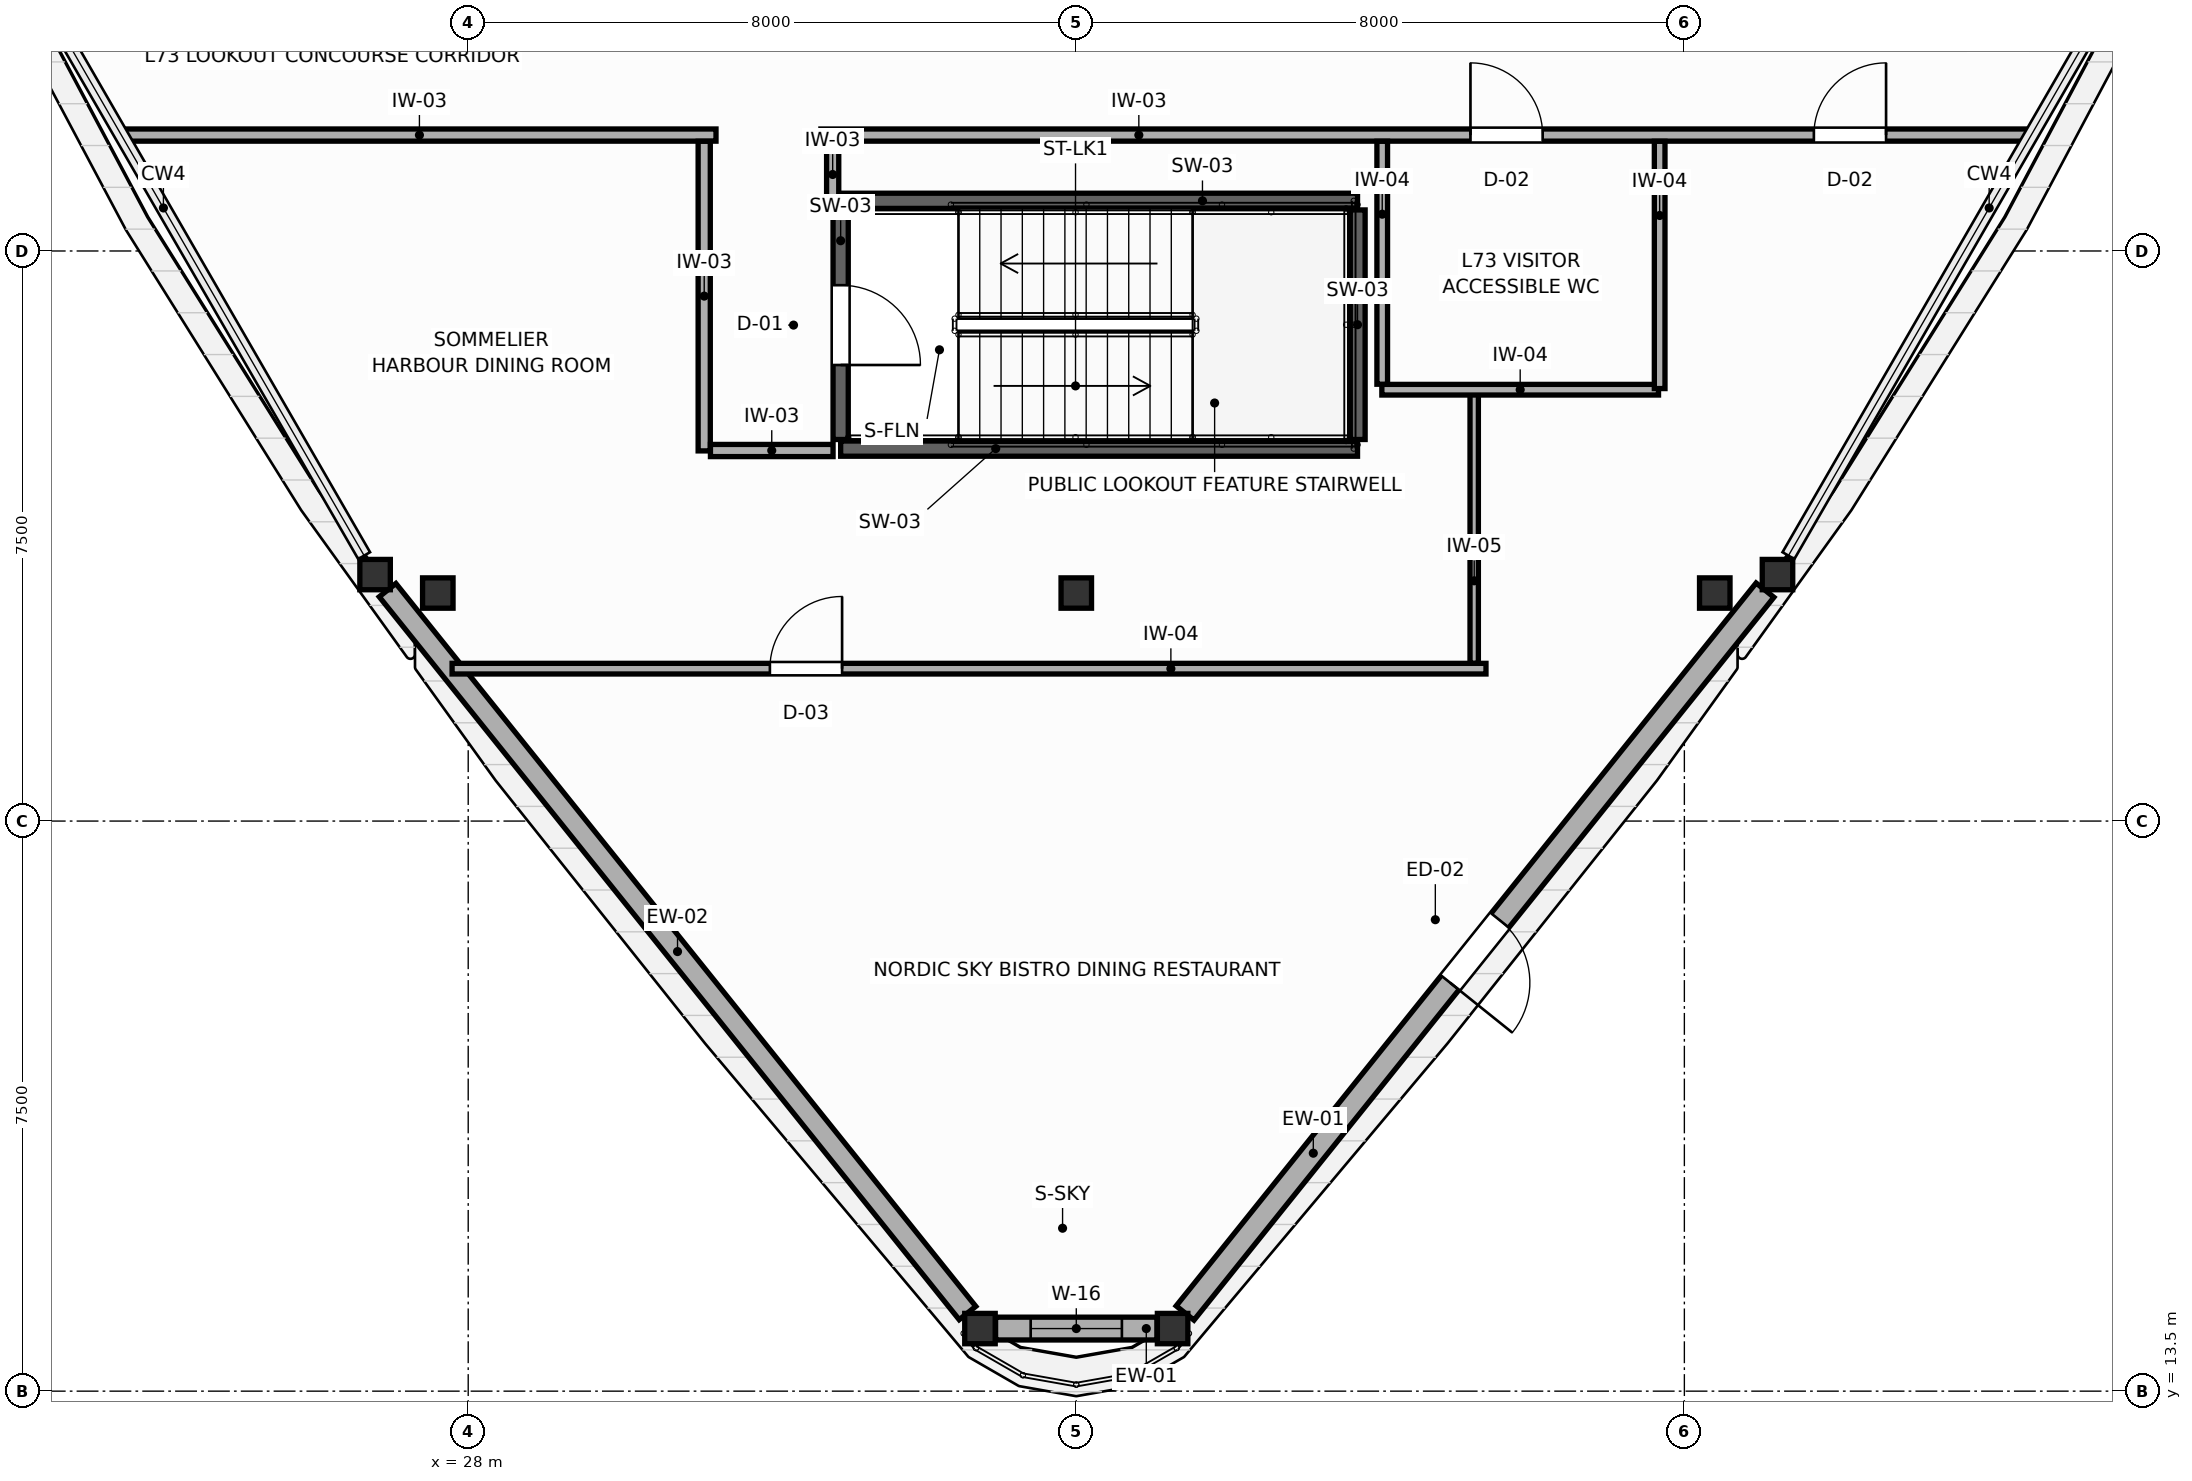
"""IFC4 building model, lengths in metres.
Left out: names, types, materials, properties, quantities, classifications, styles, units other than length and angle.
Written with IfcOpenShell. Run it as: python <this file> out.ifc"""

import sys

from ifc_helpers import new_model, si_unit, direction, frame, frame_2d, origin, origin_2d, place, context, subcontext, project, spatial, rectangle, i_section, extrude, source, transform, mapped, element, fill, save


model = new_model("IFC4")
c1 = context("Model", 3, precision=1e-05, world=origin(), true_north=direction((0.0, 1.0)))
c2 = subcontext(c1, "Body", "Model", "MODEL_VIEW")
j1 = project(units=[si_unit("LENGTHUNIT", "METRE"), si_unit("PLANEANGLEUNIT", "RADIAN")], contexts=[c1])
p1 = place(None, origin())
s1 = spatial("IfcSite", under=j1, at=p1, CompositionType="ELEMENT")
p2 = place(p1, origin())
s2 = spatial("IfcBuilding", under=s1, at=p2, CompositionType="ELEMENT")
p3 = place(p2, frame((0.0, 0.0, 279.6)))
s3 = spatial("IfcBuildingStorey", under=s2, at=p3, CompositionType="ELEMENT", Elevation=279.6)
m1 = source(origin(), c2, "Body", "SweptSolid", [
    extrude(i_section(OverallWidth=0.401, OverallDepth=0.399, WebThickness=0.022, FlangeThickness=0.036, FilletRadius=0.015, at=origin_2d()), origin(), (0.0, 0.0, 1.0), 4.2),
])
for number, where, z_axis, x_axis in (
    (1, (27.6, 24.0, 0.0), (0.0, 0.0, 1.0), (1.0, 0.0, 0.0)),
    (2, (44.4, 24.0, 0.0), (0.0, 0.0, 1.0), (1.0, 0.0, 0.0)),
    (3, (36.0, 24.0, 0.0), (0.0, 0.0, 1.0), (1.0, 0.0, 0.0)),
):
    element("IfcColumn", number, at=place(p3, frame(where, z_axis=z_axis, x_axis=x_axis)), inside=s3, PredefinedType="COLUMN", context=c2, shape_type="MappedRepresentation", body=[
        mapped(m1, transform((0.0, 0.0, 0.0), scale=1.0)),
    ])
for number, where, z_axis, x_axis in (
    (4, (32.9, 29.16, 0.0), (0.0, 0.0, 1.0), (1.0, 0.0, 0.0)),
    (5, (32.9, 25.9, 0.0), (0.0, 0.0, 1.0), (1.0, 0.0, 0.0)),
):
    element("IfcWall", number, at=place(p3, frame(where, z_axis=z_axis, x_axis=x_axis)), inside=s3, PredefinedType="SHEAR", context=c2, shape_type="SweptSolid", body=[
        extrude(rectangle(XDim=6.8, YDim=0.2, at=frame_2d((3.4, 0.0))), origin(), (0.0, 0.0, 1.0), 4.2),
    ])
p4 = place(p3, frame((39.7, 26.02, 0.0), z_axis=(0.0, 0.0, 1.0), x_axis=(0.0, 1.0, 0.0)))
e6 = element("IfcWall", 6, at=p4, inside=s3, PredefinedType="SHEAR", context=c2, shape_type="SweptSolid", body=[
    extrude(rectangle(XDim=3.02, YDim=0.2, at=frame_2d((1.51, 0.0))), origin(), (0.0, 0.0, 1.0), 4.2),
])
for number, where, z_axis, x_axis in (
    (7, (26.775, 24.243, 0.0), (0.0, 0.0, 1.0), (1.0, 0.0, 0.0)),
    (8, (34.733, 14.323, 0.0), (0.0, 0.0, 1.0), (1.0, 0.0, 0.0)),
    (9, (37.267, 14.323, 0.0), (0.0, 0.0, 1.0), (1.0, 0.0, 0.0)),
    (10, (45.225, 24.243, 0.0), (0.0, 0.0, 1.0), (1.0, 0.0, 0.0)),
):
    element("IfcColumn", number, at=place(p3, frame(where, z_axis=z_axis, x_axis=x_axis)), inside=s3, PredefinedType="COLUMN", context=c2, shape_type="MappedRepresentation", body=[
        mapped(m1, transform((0.0, 0.0, 0.0), scale=1.0)),
    ])
p5 = place(p3, frame((26.939, 24.038, 0.0), z_axis=(0.0, 0.0, 1.0), x_axis=(0.625766469369, -0.780010465195, 0.0)))
e11 = element("IfcWall", 11, at=p5, inside=s3, PredefinedType="SOLIDWALL", context=c2, shape_type="SweptSolid", body=[
    extrude(rectangle(XDim=12.192, YDim=0.28, at=frame_2d((6.096, 0.0))), origin(), (0.0, 0.0, 1.0), 2.52),
])
p6 = place(p3, frame((34.938, 14.323, 0.0), z_axis=(0.0, 0.0, 1.0), x_axis=(1.0, 0.0, 0.0)))
e12 = element("IfcWall", 12, at=p6, inside=s3, PredefinedType="SOLIDWALL", context=c2, shape_type="SweptSolid", body=[
    extrude(rectangle(XDim=2.124, YDim=0.3, at=frame_2d((1.062, 0.0))), origin(), (0.0, 0.0, 1.0), 2.52),
])
p7 = place(p6, frame((0.462, 0.0, 0.75)))
e13 = element("IfcOpeningElement", 13, at=p7, cuts=e12, PredefinedType="OPENING", context=c2, shape_type="SweptSolid", body=[
    extrude(rectangle(XDim=1.2, YDim=1.55, at=frame_2d((0.6, 0.775))), frame((0.0, 0.16, 0.0), z_axis=(0.0, -1.0, 0.0), x_axis=(1.0, 0.0, 0.0)), (0.0, 0.0, 1.0), 0.32),
])
p8 = place(p3, frame((37.431, 14.528, 0.0), z_axis=(0.0, 0.0, 1.0), x_axis=(0.625766469369, 0.780010465195, 0.0)))
e14 = element("IfcWall", 14, at=p8, inside=s3, PredefinedType="SOLIDWALL", context=c2, shape_type="SweptSolid", body=[
    extrude(rectangle(XDim=12.192, YDim=0.3, at=frame_2d((6.096, 0.0))), origin(), (0.0, 0.0, 1.0), 2.52),
])
p9 = place(p8, frame((5.571, 0.0, 0.0)))
e15 = element("IfcOpeningElement", 15, at=p9, cuts=e14, PredefinedType="OPENING", context=c2, shape_type="SweptSolid", body=[
    extrude(rectangle(XDim=1.05, YDim=2.1, at=frame_2d((0.525, 1.05))), frame((0.0, 0.16, 0.0), z_axis=(0.0, -1.0, 0.0), x_axis=(1.0, 0.0, 0.0)), (0.0, 0.0, 1.0), 0.32),
])
p10 = place(p3, frame((32.9, 26.02, 0.0), z_axis=(0.0, 0.0, 1.0), x_axis=(0.0, 1.0, 0.0)))
e16 = element("IfcWall", 16, at=p10, inside=s3, PredefinedType="SHEAR", context=c2, shape_type="SweptSolid", body=[
    extrude(rectangle(XDim=3.02, YDim=0.2, at=frame_2d((1.51, 0.0))), origin(), (0.0, 0.0, 1.0), 4.2),
])
p11 = place(p10, frame((0.98, 0.0, 0.0)))
e17 = element("IfcOpeningElement", 17, at=p11, cuts=e16, PredefinedType="OPENING", context=c2, shape_type="SweptSolid", body=[
    extrude(rectangle(XDim=1.05, YDim=2.1, at=frame_2d((0.525, 1.05))), frame((0.0, 0.11, 0.0), z_axis=(0.0, -1.0, 0.0), x_axis=(1.0, 0.0, 0.0)), (0.0, 0.0, 1.0), 0.22),
])
p12 = place(p3, frame((32.64, 30.025, 0.0), z_axis=(0.0, 0.0, 1.0), x_axis=(1.0, 0.0, 0.0)))
e18 = element("IfcWall", 18, at=p12, inside=s3, PredefinedType="PARTITIONING", context=c2, shape_type="SweptSolid", body=[
    extrude(rectangle(XDim=15.921, YDim=0.16, at=frame_2d((7.96, 0.0))), origin(), (0.0, 0.0, 1.0), 3.96),
])
p13 = place(p12, frame((8.546, 0.0, 0.0)))
e19 = element("IfcOpeningElement", 19, at=p13, cuts=e18, PredefinedType="OPENING", context=c2, shape_type="SweptSolid", body=[
    extrude(rectangle(XDim=0.95, YDim=2.05, at=frame_2d((0.475, 1.025))), frame((0.0, 0.09, 0.0), z_axis=(0.0, -1.0, 0.0), x_axis=(1.0, 0.0, 0.0)), (0.0, 0.0, 1.0), 0.18),
])
p14 = place(p12, frame((13.064, 0.0, 0.0)))
e20 = element("IfcOpeningElement", 20, at=p14, cuts=e18, PredefinedType="OPENING", context=c2, shape_type="SweptSolid", body=[
    extrude(rectangle(XDim=0.95, YDim=2.05, at=frame_2d((0.475, 1.025))), frame((0.0, 0.09, 0.0), z_axis=(0.0, -1.0, 0.0), x_axis=(1.0, 0.0, 0.0)), (0.0, 0.0, 1.0), 0.18),
])
p15 = place(p3, frame((23.456, 30.025, 0.0), z_axis=(0.0, 0.0, 1.0), x_axis=(1.0, 0.0, 0.0)))
e21 = element("IfcWall", 21, at=p15, inside=s3, PredefinedType="PARTITIONING", context=c2, shape_type="SweptSolid", body=[
    extrude(rectangle(XDim=7.804, YDim=0.16, at=frame_2d((3.902, 0.0))), origin(), (0.0, 0.0, 1.0), 3.96),
])
p16 = place(p3, frame((31.105, 25.87, 0.0), z_axis=(0.0, 0.0, 1.0), x_axis=(0.0, 1.0, 0.0)))
e22 = element("IfcWall", 22, at=p16, inside=s3, PredefinedType="PARTITIONING", context=c2, shape_type="SweptSolid", body=[
    extrude(rectangle(XDim=4.073, YDim=0.16, at=frame_2d((2.037, 0.0))), origin(), (0.0, 0.0, 1.0), 3.96),
])
p17 = place(p3, frame((31.187, 25.875, 0.0), z_axis=(0.0, 0.0, 1.0), x_axis=(1.0, 0.0, 0.0)))
e23 = element("IfcWall", 23, at=p17, inside=s3, PredefinedType="PARTITIONING", context=c2, shape_type="SweptSolid", body=[
    extrude(rectangle(XDim=1.613, YDim=0.16, at=frame_2d((0.807, 0.0))), origin(), (0.0, 0.0, 1.0), 3.96),
])
p18 = place(p3, frame((32.795, 29.07, 0.0), z_axis=(0.0, 0.0, 1.0), x_axis=(0.0, 1.0, 0.0)))
e24 = element("IfcWall", 24, at=p18, inside=s3, PredefinedType="PARTITIONING", context=c2, shape_type="SweptSolid", body=[
    extrude(rectangle(XDim=0.873, YDim=0.16, at=frame_2d((0.437, 0.0))), origin(), (0.0, 0.0, 1.0), 3.96),
])
p19 = place(p3, frame((27.788, 23.005, 0.0), z_axis=(0.0, 0.0, 1.0), x_axis=(1.0, 0.0, 0.0)))
e25 = element("IfcWall", 25, at=p19, inside=s3, PredefinedType="PARTITIONING", context=c2, shape_type="SweptSolid", body=[
    extrude(rectangle(XDim=13.602, YDim=0.14, at=frame_2d((6.801, 0.0))), origin(), (0.0, 0.0, 1.0), 3.96),
])
p20 = place(p19, frame((4.181, 0.0, 0.0)))
e26 = element("IfcOpeningElement", 26, at=p20, cuts=e25, PredefinedType="OPENING", context=c2, shape_type="SweptSolid", body=[
    extrude(rectangle(XDim=0.95, YDim=2.05, at=frame_2d((0.475, 1.025))), frame((0.0, 0.08, 0.0), z_axis=(0.0, -1.0, 0.0), x_axis=(1.0, 0.0, 0.0)), (0.0, 0.0, 1.0), 0.16),
])
p21 = place(p3, frame((41.235, 23.077, 0.0), z_axis=(0.0, 0.0, 1.0), x_axis=(0.0, 1.0, 0.0)))
e27 = element("IfcWall", 27, at=p21, inside=s3, PredefinedType="MOVABLE", context=c2, shape_type="SweptSolid", body=[
    extrude(rectangle(XDim=3.613, YDim=0.11, at=frame_2d((1.807, 0.0))), origin(), (0.0, 0.0, 1.0), 3.96),
])
p22 = place(p3, frame((40.02, 26.675, 0.0), z_axis=(0.0, 0.0, 1.0), x_axis=(1.0, 0.0, 0.0)))
e28 = element("IfcWall", 28, at=p22, inside=s3, PredefinedType="PARTITIONING", context=c2, shape_type="SweptSolid", body=[
    extrude(rectangle(XDim=3.64, YDim=0.14, at=frame_2d((1.82, 0.0))), origin(), (0.0, 0.0, 1.0), 3.96),
])
p23 = place(p3, frame((40.025, 26.747, 0.0), z_axis=(0.0, 0.0, 1.0), x_axis=(0.0, 1.0, 0.0)))
e29 = element("IfcWall", 29, at=p23, inside=s3, PredefinedType="PARTITIONING", context=c2, shape_type="SweptSolid", body=[
    extrude(rectangle(XDim=3.196, YDim=0.14, at=frame_2d((1.598, 0.0))), origin(), (0.0, 0.0, 1.0), 3.96),
])
p24 = place(p3, frame((43.675, 26.69, 0.0), z_axis=(0.0, 0.0, 1.0), x_axis=(0.0, 1.0, 0.0)))
e30 = element("IfcWall", 30, at=p24, inside=s3, PredefinedType="PARTITIONING", context=c2, shape_type="SweptSolid", body=[
    extrude(rectangle(XDim=3.253, YDim=0.14, at=frame_2d((1.626, 0.0))), origin(), (0.0, 0.0, 1.0), 3.96),
])
p25 = place(p7, origin())
e31 = element("IfcWindow", 31, at=p25, inside=s3, PartitioningType="SINGLE_PANEL", PredefinedType="WINDOW", context=c2, shape_type="SweptSolid", body=[
    extrude(rectangle(XDim=1.2, YDim=1.55, at=frame_2d((0.6, 0.775))), frame((0.0, 0.03, 0.0), z_axis=(0.0, -1.0, 0.0), x_axis=(1.0, 0.0, 0.0)), (0.0, 0.0, 1.0), 0.06),
])
fill(e13, e31)
p26 = place(p9, frame((1.05, 0.0, 0.0), z_axis=(0.0, 0.0, 1.0), x_axis=(-1.0, 0.0, 0.0)))
e32 = element("IfcDoor", 32, at=p26, inside=s3, OperationType="SINGLE_SWING_RIGHT", PredefinedType="DOOR", context=c2, shape_type="SweptSolid", body=[
    extrude(rectangle(XDim=1.05, YDim=2.1, at=frame_2d((0.525, 1.05))), frame((0.0, 0.025, 0.0), z_axis=(0.0, -1.0, 0.0), x_axis=(1.0, 0.0, 0.0)), (0.0, 0.0, 1.0), 0.05),
])
fill(e15, e32)
p27 = place(p11, frame((1.05, 0.0, 0.0), z_axis=(0.0, 0.0, 1.0), x_axis=(-1.0, 0.0, 0.0)))
e33 = element("IfcDoor", 33, at=p27, inside=s3, OperationType="SINGLE_SWING_RIGHT", PredefinedType="DOOR", context=c2, shape_type="SweptSolid", body=[
    extrude(rectangle(XDim=1.05, YDim=2.1, at=frame_2d((0.525, 1.05))), frame((0.0, 0.025, 0.0), z_axis=(0.0, -1.0, 0.0), x_axis=(1.0, 0.0, 0.0)), (0.0, 0.0, 1.0), 0.05),
])
fill(e17, e33)
p28 = place(p13, origin())
e34 = element("IfcDoor", 34, at=p28, inside=s3, OperationType="SINGLE_SWING_LEFT", PredefinedType="DOOR", context=c2, shape_type="SweptSolid", body=[
    extrude(rectangle(XDim=0.95, YDim=2.05, at=frame_2d((0.475, 1.025))), frame((0.0, 0.025, 0.0), z_axis=(0.0, -1.0, 0.0), x_axis=(1.0, 0.0, 0.0)), (0.0, 0.0, 1.0), 0.05),
])
fill(e19, e34)
p29 = place(p14, origin())
e35 = element("IfcDoor", 35, at=p29, inside=s3, OperationType="SINGLE_SWING_RIGHT", PredefinedType="DOOR", context=c2, shape_type="SweptSolid", body=[
    extrude(rectangle(XDim=0.95, YDim=2.05, at=frame_2d((0.475, 1.025))), frame((0.0, 0.025, 0.0), z_axis=(0.0, -1.0, 0.0), x_axis=(1.0, 0.0, 0.0)), (0.0, 0.0, 1.0), 0.05),
])
fill(e20, e35)
p30 = place(p20, origin())
e36 = element("IfcDoor", 36, at=p30, inside=s3, OperationType="SINGLE_SWING_RIGHT", PredefinedType="DOOR", context=c2, shape_type="SweptSolid", body=[
    extrude(rectangle(XDim=0.95, YDim=2.05, at=frame_2d((0.475, 1.025))), frame((0.0, 0.025, 0.0), z_axis=(0.0, -1.0, 0.0), x_axis=(1.0, 0.0, 0.0)), (0.0, 0.0, 1.0), 0.05),
])
fill(e26, e36)
save(model, sys.argv[1])
